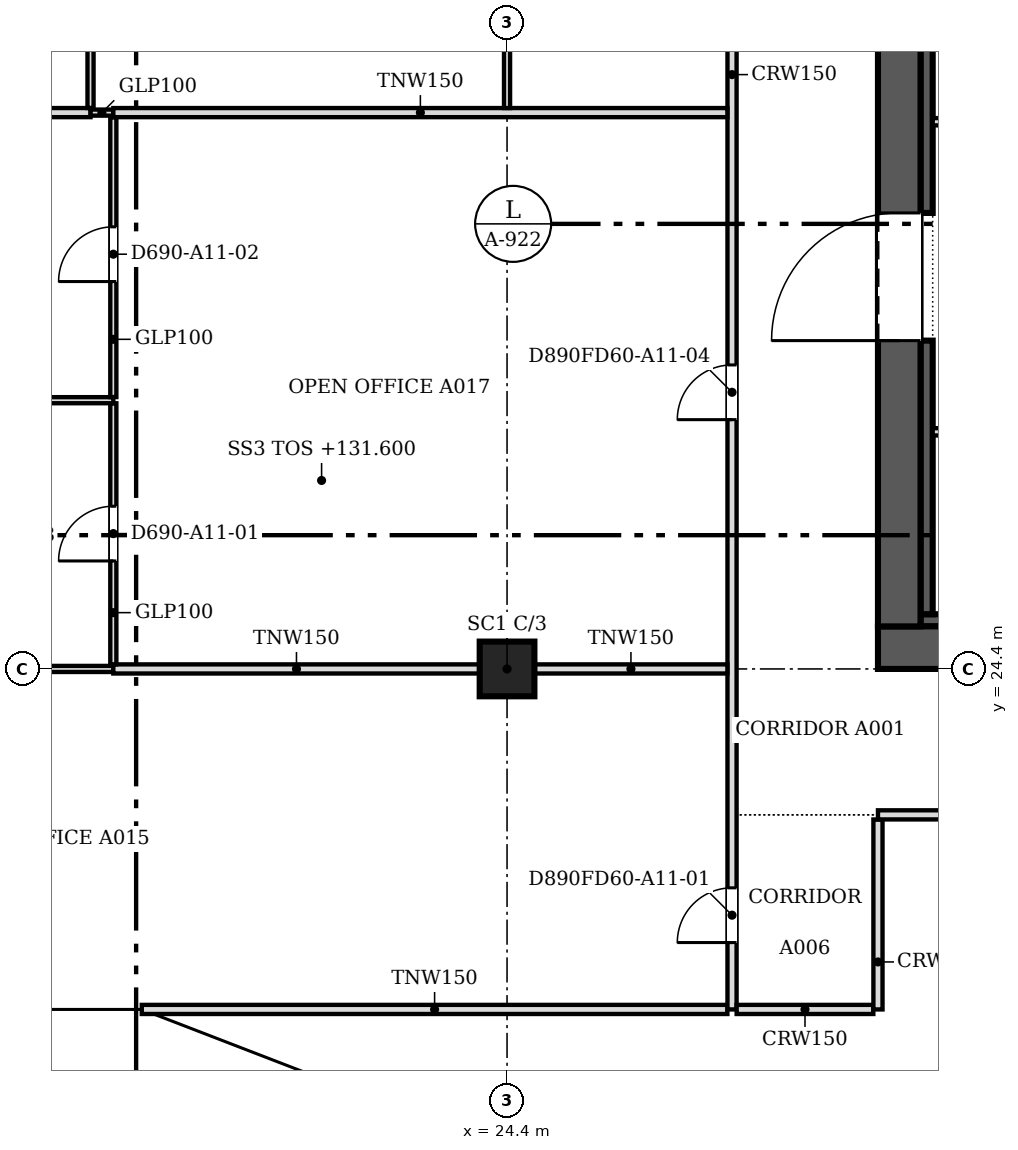
"""IFC4 building model, lengths in metres.
Left out: names, types, materials, properties, quantities, classifications, styles, units other than length and angle.
Written with IfcOpenShell. Run it as: python <this file> out.ifc"""

import sys

from ifc_helpers import new_model, si_unit, direction, frame, frame_2d, origin, origin_2d, place, context, subcontext, project, spatial, polyline, rectangle, outline, extrude, faceted_brep, source, transform, mapped, element, fill, save


model = new_model("IFC4")
c1 = context("Model", 3, precision=1e-05, world=origin(), true_north=direction((0.0, 1.0)))
c2 = subcontext(c1, "Body", "Model", "MODEL_VIEW")
j1 = project(units=[si_unit("LENGTHUNIT", "METRE"), si_unit("PLANEANGLEUNIT", "RADIAN")], contexts=[c1])
p1 = place(None, origin())
s1 = spatial("IfcSite", under=j1, at=p1, CompositionType="ELEMENT")
p2 = place(p1, origin())
s2 = spatial("IfcBuilding", under=s1, at=p2, CompositionType="ELEMENT")
p3 = place(p2, frame((0.0, 0.0, 131.6)))
s3 = spatial("IfcBuildingStorey", under=s2, at=p3, CompositionType="ELEMENT", Elevation=131.6)
p4 = place(p3, frame((24.4, 24.4, 0.0), z_axis=(0.0, 0.0, 1.0), x_axis=(1.0, 0.0, 0.0)))
e1 = element("IfcColumn", 1, at=p4, inside=s3, PredefinedType="COLUMN", context=c2, shape_type="SweptSolid", body=[
    extrude(rectangle(XDim=0.9, YDim=0.9, at=origin_2d()), origin(), (0.0, 0.0, 1.0), 3.6),
])
m1 = source(origin(), c2, "Body", "Brep", [
    faceted_brep([(3.05, -0.25, 0.0), (6.1, -0.25, 3.743), (6.1, -0.25, 3.857), (3.05, -0.25, 7.6), (0.0, -0.25, 3.8), (0.0, 0.25, 3.8), (3.05, 0.25, 7.6), (6.146, 0.25, 3.8), (3.05, 0.25, 0.0), (6.146, -0.0, 3.8)], [[[0, 1, 2, 3, 4]], [[5, 6, 7, 8]], [[8, 7, 9, 1, 0]], [[7, 6, 3, 2, 9]], [[6, 5, 4, 3]], [[5, 8, 0, 4]], [[1, 9, 2]]]),
])
p5 = place(p3, frame((12.2, 18.55, -3.8), z_axis=(0.0, 0.0, 1.0), x_axis=(1.0, 0.0, 0.0)))
e2 = element("IfcWall", 2, at=p5, inside=s3, PredefinedType="SOLIDWALL", context=c2, shape_type="MappedRepresentation", body=[
    mapped(m1, transform((0.0, 0.0, 0.0), scale=1.0)),
])
m2 = source(origin(), c2, "Body", "SweptSolid", [
    extrude(outline(polyline([(3.052, 0.397), (5.824, 3.8), (3.052, 7.202), (0.321, 3.8), (3.052, 0.397)])), frame((0.0, 0.26, 0.0), z_axis=(0.0, -1.0, 0.0), x_axis=(1.0, 0.0, 0.0)), (0.0, 0.0, 1.0), 0.52),
])
p6 = place(p5, origin())
e3 = element("IfcOpeningElement", 3, at=p6, cuts=e2, PredefinedType="OPENING", context=c2, shape_type="MappedRepresentation", body=[
    mapped(m2, transform((0.0, 0.0, 0.0), scale=1.0)),
])
m3 = source(origin(), c2, "Body", "Brep", [
    faceted_brep([(3.096, -0.25, 7.536), (0.047, -0.25, 3.856), (0.047, -0.25, 3.744), (3.096, -0.25, 0.064), (0.0, 0.25, 3.8), (3.149, 0.25, 7.6), (3.202, 0.25, 7.536), (3.202, 0.25, 0.064), (3.149, 0.25, 0.0), (3.149, -0.0, 0.0), (3.149, -0.0, 7.6), (0.0, 0.0, 3.8)], [[[0, 1, 2, 3]], [[4, 5, 6, 7, 8]], [[8, 7, 9]], [[6, 5, 10]], [[5, 4, 11, 1, 0, 10]], [[4, 8, 9, 3, 2, 11]], [[2, 1, 11]], [[3, 9, 7, 6, 10, 0]]]),
])
p7 = place(p3, frame((18.346, 18.55, -3.8), z_axis=(0.0, 0.0, 1.0), x_axis=(0.932985567668, -0.359913782069, 0.0)))
e4 = element("IfcWall", 4, at=p7, inside=s3, PredefinedType="SOLIDWALL", context=c2, shape_type="MappedRepresentation", body=[
    mapped(m3, transform((0.0, 0.0, 0.0), scale=1.0)),
])
m4 = source(origin(), c2, "Body", "SweptSolid", [
    extrude(outline(polyline([(2.949, 6.967), (0.325, 3.8), (2.949, 0.633), (2.949, 6.967)])), frame((0.0, 0.26, 0.0), z_axis=(0.0, -1.0, 0.0), x_axis=(1.0, 0.0, 0.0)), (0.0, 0.0, 1.0), 0.52),
])
p8 = place(p7, origin())
e5 = element("IfcOpeningElement", 5, at=p8, cuts=e4, PredefinedType="OPENING", context=c2, shape_type="MappedRepresentation", body=[
    mapped(m4, transform((0.0, 0.0, 0.0), scale=1.0)),
])
p9 = place(p2, frame((0.0, 0.0, 135.4)))
s4 = spatial("IfcBuildingStorey", under=s2, at=p9, CompositionType="ELEMENT", Elevation=135.4)
m5 = source(origin(), c2, "Body", "Brep", [
    faceted_brep([(3.05, -0.25, 7.543), (0.0, -0.25, 3.8), (3.05, -0.25, 0.057), (0.0, 0.25, 3.8), (3.096, 0.25, 7.6), (3.143, 0.25, 7.543), (3.143, 0.25, 0.056), (3.096, 0.25, 0.0), (3.096, -0.0, 0.0), (3.096, -0.0, 7.6)], [[[0, 1, 2]], [[3, 4, 5, 6, 7]], [[7, 6, 8]], [[5, 4, 9]], [[4, 3, 1, 0, 9]], [[3, 7, 8, 2, 1]], [[2, 8, 6, 5, 9, 0]]]),
])
p10 = place(p9, frame((15.25, 18.55, -3.8), z_axis=(0.0, 0.0, 1.0), x_axis=(1.0, 0.0, 0.0)))
e6 = element("IfcWall", 6, at=p10, inside=s4, PredefinedType="SOLIDWALL", context=c2, shape_type="MappedRepresentation", body=[
    mapped(m5, transform((0.0, 0.0, 0.0), scale=1.0)),
])
m6 = source(origin(), c2, "Body", "SweptSolid", [
    extrude(outline(polyline([(2.896, 6.959), (0.323, 3.8), (2.896, 0.641), (2.896, 6.959)])), frame((0.0, 0.26, 0.0), z_axis=(0.0, -1.0, 0.0), x_axis=(1.0, 0.0, 0.0)), (0.0, 0.0, 1.0), 0.52),
])
p11 = place(p10, origin())
e7 = element("IfcOpeningElement", 7, at=p11, cuts=e6, PredefinedType="OPENING", context=c2, shape_type="MappedRepresentation", body=[
    mapped(m6, transform((0.0, 0.0, 0.0), scale=1.0)),
])
m7 = source(origin(), c2, "Body", "Brep", [
    faceted_brep([(0.093, -0.25, 0.056), (3.143, -0.25, 3.736), (3.143, -0.25, 3.864), (0.093, -0.25, 7.544), (0.0, 0.25, 7.543), (0.047, 0.25, 7.6), (3.196, 0.25, 3.8), (0.047, 0.25, 0.0), (0.0, 0.25, 0.057), (3.196, -0.0, 3.8), (0.047, 0.0, 0.0), (0.047, 0.0, 7.6)], [[[0, 1, 2, 3]], [[4, 5, 6, 7, 8]], [[7, 6, 9, 1, 0, 10]], [[6, 5, 11, 3, 2, 9]], [[5, 4, 11]], [[8, 7, 10]], [[8, 10, 0, 3, 11, 4]], [[1, 9, 2]]]),
])
p12 = place(p9, frame((18.303, 18.567, -3.8), z_axis=(0.0, 0.0, 1.0), x_axis=(0.932978940178, -0.359930961693, 0.0)))
e8 = element("IfcWall", 8, at=p12, inside=s4, PredefinedType="SOLIDWALL", context=c2, shape_type="MappedRepresentation", body=[
    mapped(m7, transform((0.0, 0.0, 0.0), scale=1.0)),
])
m8 = source(origin(), c2, "Body", "SweptSolid", [
    extrude(outline(polyline([(0.247, 0.633), (2.871, 3.8), (0.247, 6.967), (0.247, 0.633)])), frame((0.0, 0.26, 0.0), z_axis=(0.0, -1.0, 0.0), x_axis=(1.0, 0.0, 0.0)), (0.0, 0.0, 1.0), 0.52),
])
p13 = place(p12, origin())
e9 = element("IfcOpeningElement", 9, at=p13, cuts=e8, PredefinedType="OPENING", context=c2, shape_type="MappedRepresentation", body=[
    mapped(m8, transform((0.0, 0.0, 0.0), scale=1.0)),
])
p14 = place(p3, frame((54.9, 24.75, 0.0), z_axis=(0.0, 0.0, 1.0), x_axis=(-1.0, 0.0, 0.0)))
e10 = element("IfcWall", 10, at=p14, inside=s3, PredefinedType="SHEAR", context=c2, shape_type="SweptSolid", body=[
    extrude(rectangle(XDim=24.4, YDim=0.7, at=frame_2d((12.2, 0.0))), origin(), (0.0, 0.0, 1.0), 3.8),
])
m9 = source(origin(), c2, "Body", "SweptSolid", [
    extrude(rectangle(XDim=1.2, YDim=2.1, at=frame_2d((0.6, 1.05))), frame((0.0, 0.36, 0.0), z_axis=(0.0, -1.0, 0.0), x_axis=(1.0, 0.0, 0.0)), (0.0, 0.0, 1.0), 0.72),
])
p15 = place(p14, frame((1.5, 0.0, 0.0)))
e11 = element("IfcOpeningElement", 11, at=p15, cuts=e10, PredefinedType="OPENING", context=c2, shape_type="MappedRepresentation", body=[
    mapped(m9, transform((0.0, 0.0, 0.0), scale=1.0)),
])
p16 = place(p3, frame((30.85, 25.1, 0.0), z_axis=(0.0, 0.0, 1.0), x_axis=(0.0, 1.0, 0.0)))
e12 = element("IfcWall", 12, at=p16, inside=s3, PredefinedType="SHEAR", context=c2, shape_type="SweptSolid", body=[
    extrude(rectangle(XDim=23.0, YDim=0.7, at=frame_2d((11.5, 0.0))), origin(), (0.0, 0.0, 1.0), 3.8),
])
m10 = source(origin(), c2, "Body", "SweptSolid", [
    extrude(rectangle(XDim=2.1, YDim=2.4, at=frame_2d((1.05, 1.2))), frame((0.0, 0.36, 0.0), z_axis=(0.0, -1.0, 0.0), x_axis=(1.0, 0.0, 0.0)), (0.0, 0.0, 1.0), 0.72),
])
p17 = place(p16, frame((4.7, 0.0, 0.0)))
e13 = element("IfcOpeningElement", 13, at=p17, cuts=e12, PredefinedType="OPENING", context=c2, shape_type="MappedRepresentation", body=[
    mapped(m10, transform((0.0, 0.0, 0.0), scale=1.0)),
])
p18 = place(p16, frame((16.2, 0.0, 0.0)))
e14 = element("IfcOpeningElement", 14, at=p18, cuts=e12, PredefinedType="OPENING", context=c2, shape_type="MappedRepresentation", body=[
    mapped(m10, transform((0.0, 0.0, 0.0), scale=1.0)),
])
p19 = place(p3, frame((31.2, 25.2, 0.0), z_axis=(0.0, 0.0, 1.0), x_axis=(1.0, 0.0, 0.0)))
e15 = element("IfcWall", 15, at=p19, inside=s3, PredefinedType="SOLIDWALL", context=c2, shape_type="SweptSolid", body=[
    extrude(rectangle(XDim=21.0, YDim=0.2, at=frame_2d((10.5, 0.0))), origin(), (0.0, 0.0, 1.0), 3.8),
])
p20 = place(p3, frame((31.3, 25.3, 0.0), z_axis=(0.0, 0.0, 1.0), x_axis=(0.0, 1.0, 0.0)))
e16 = element("IfcWall", 16, at=p20, inside=s3, PredefinedType="SOLIDWALL", context=c2, shape_type="SweptSolid", body=[
    extrude(rectangle(XDim=4.5, YDim=0.2, at=frame_2d((2.25, 0.0))), origin(), (0.0, 0.0, 1.0), 3.8),
])
p21 = place(p3, frame((31.3, 31.9, 0.0), z_axis=(0.0, 0.0, 1.0), x_axis=(0.0, 1.0, 0.0)))
e17 = element("IfcWall", 17, at=p21, inside=s3, PredefinedType="SOLIDWALL", context=c2, shape_type="SweptSolid", body=[
    extrude(rectangle(XDim=9.4, YDim=0.2, at=frame_2d((4.7, 0.0))), origin(), (0.0, 0.0, 1.0), 3.8),
])
p22 = place(p3, frame((31.4, 33.4, 0.0), z_axis=(0.0, 0.0, 1.0), x_axis=(1.0, 0.0, 0.0)))
e18 = element("IfcWall", 18, at=p22, inside=s3, PredefinedType="PARTITIONING", context=c2, shape_type="SweptSolid", body=[
    extrude(rectangle(XDim=11.05, YDim=0.12, at=frame_2d((5.525, 0.0))), origin(), (0.0, 0.0, 1.0), 3.6),
])
m11 = source(origin(), c2, "Body", "SweptSolid", [
    extrude(rectangle(XDim=0.9, YDim=2.1, at=frame_2d((0.45, 1.05))), frame((0.0, 0.07, 0.0), z_axis=(0.0, -1.0, 0.0), x_axis=(1.0, 0.0, 0.0)), (0.0, 0.0, 1.0), 0.14),
])
p23 = place(p22, frame((0.962, 0.0, 0.0)))
e19 = element("IfcOpeningElement", 19, at=p23, cuts=e18, PredefinedType="OPENING", context=c2, shape_type="MappedRepresentation", body=[
    mapped(m11, transform((0.0, 0.0, 0.0), scale=1.0)),
])
p24 = place(p22, frame((6.613, 0.0, 0.0)))
e20 = element("IfcOpeningElement", 20, at=p24, cuts=e18, PredefinedType="OPENING", context=c2, shape_type="MappedRepresentation", body=[
    mapped(m11, transform((0.0, 0.0, 0.0), scale=1.0)),
])
p25 = place(p3, frame((39.875, 28.3, 0.0), z_axis=(0.0, 0.0, 1.0), x_axis=(-1.0, 0.0, 0.0)))
e21 = element("IfcWall", 21, at=p25, inside=s3, PredefinedType="PARTITIONING", context=c2, shape_type="SweptSolid", body=[
    extrude(rectangle(XDim=8.475, YDim=0.12, at=frame_2d((4.238, 0.0))), origin(), (0.0, 0.0, 1.0), 3.6),
])
p26 = place(p25, frame((3.788, 0.0, 0.0)))
e22 = element("IfcOpeningElement", 22, at=p26, cuts=e21, PredefinedType="OPENING", context=c2, shape_type="MappedRepresentation", body=[
    mapped(m11, transform((0.0, 0.0, 0.0), scale=1.0)),
])
p27 = place(p3, frame((18.393, 18.8, 0.0), z_axis=(0.0, 0.0, 1.0), x_axis=(1.0, 0.0, 0.0)))
e23 = element("IfcWall", 23, at=p27, inside=s3, PredefinedType="PARTITIONING", context=c2, shape_type="SweptSolid", body=[
    extrude(rectangle(XDim=9.631, YDim=0.15, at=frame_2d((4.815, 0.0))), origin(), (0.0, 0.0, 1.0), 3.067),
])
p28 = place(p3, frame((28.1, 18.8, 0.0), z_axis=(0.0, 0.0, 1.0), x_axis=(0.0, 1.0, 0.0)))
e24 = element("IfcWall", 24, at=p28, inside=s3, PredefinedType="PARTITIONING", context=c2, shape_type="SweptSolid", body=[
    extrude(rectangle(XDim=26.5, YDim=0.15, at=frame_2d((13.25, 0.0))), origin(), (0.0, 0.0, 1.0), 3.067),
])
m12 = source(origin(), c2, "Body", "SweptSolid", [
    extrude(rectangle(XDim=0.9, YDim=2.1, at=frame_2d((0.45, 1.05))), frame((0.0, 0.085, 0.0), z_axis=(0.0, -1.0, 0.0), x_axis=(1.0, 0.0, 0.0)), (0.0, 0.0, 1.0), 0.17),
])
p29 = place(p28, frame((1.1, 0.0, 0.0)))
e25 = element("IfcOpeningElement", 25, at=p29, cuts=e24, PredefinedType="OPENING", context=c2, shape_type="MappedRepresentation", body=[
    mapped(m12, transform((0.0, 0.0, 0.0), scale=1.0)),
])
p30 = place(p28, frame((9.7, 0.0, 0.0)))
e26 = element("IfcOpeningElement", 26, at=p30, cuts=e24, PredefinedType="OPENING", context=c2, shape_type="MappedRepresentation", body=[
    mapped(m12, transform((0.0, 0.0, 0.0), scale=1.0)),
])
p31 = place(p28, frame((20.15, 0.0, 0.0)))
e27 = element("IfcOpeningElement", 27, at=p31, cuts=e24, PredefinedType="OPENING", context=c2, shape_type="MappedRepresentation", body=[
    mapped(m12, transform((0.0, 0.0, 0.0), scale=1.0)),
])
p32 = place(p3, frame((28.176, 18.8, 0.0), z_axis=(0.0, 0.0, 1.0), x_axis=(1.0, 0.0, 0.0)))
e28 = element("IfcWall", 28, at=p32, inside=s3, PredefinedType="PARTITIONING", context=c2, shape_type="SweptSolid", body=[
    extrude(rectangle(XDim=2.248, YDim=0.15, at=frame_2d((1.124, 0.0))), origin(), (0.0, 0.0, 1.0), 3.067),
])
p33 = place(p3, frame((30.5, 18.8, 0.0), z_axis=(0.0, 0.0, 1.0), x_axis=(0.0, 1.0, 0.0)))
e29 = element("IfcWall", 29, at=p33, inside=s3, PredefinedType="PARTITIONING", context=c2, shape_type="SweptSolid", body=[
    extrude(rectangle(XDim=3.124, YDim=0.15, at=frame_2d((1.562, 0.0))), origin(), (0.0, 0.0, 1.0), 3.067),
])
p34 = place(p3, frame((30.5, 22.0, 0.0), z_axis=(0.0, 0.0, 1.0), x_axis=(1.0, 0.0, 0.0)))
e30 = element("IfcWall", 30, at=p34, inside=s3, PredefinedType="PARTITIONING", context=c2, shape_type="SweptSolid", body=[
    extrude(rectangle(XDim=12.5, YDim=0.15, at=frame_2d((6.25, 0.0))), origin(), (0.0, 0.0, 1.0), 3.067),
])
p35 = place(p3, frame((12.651, 24.4, 0.0), z_axis=(0.0, 0.0, 1.0), x_axis=(1.0, 0.0, 0.0)))
e31 = element("IfcWall", 31, at=p35, inside=s3, PredefinedType="PARTITIONING", context=c2, shape_type="SweptSolid", body=[
    extrude(rectangle(XDim=5.273, YDim=0.1, at=frame_2d((2.637, 0.0))), origin(), (0.0, 0.0, 1.0), 3.067),
])
p36 = place(p3, frame((17.925, 24.4, 0.0), z_axis=(0.0, 0.0, 1.0), x_axis=(1.0, 0.0, 0.0)))
e32 = element("IfcWall", 32, at=p36, inside=s3, PredefinedType="PARTITIONING", context=c2, shape_type="SweptSolid", body=[
    extrude(rectangle(XDim=6.024, YDim=0.15, at=frame_2d((3.012, 0.0))), origin(), (0.0, 0.0, 1.0), 3.067),
])
p37 = place(p3, frame((24.851, 24.4, 0.0), z_axis=(0.0, 0.0, 1.0), x_axis=(1.0, 0.0, 0.0)))
e33 = element("IfcWall", 33, at=p37, inside=s3, PredefinedType="PARTITIONING", context=c2, shape_type="SweptSolid", body=[
    extrude(rectangle(XDim=3.173, YDim=0.15, at=frame_2d((1.586, 0.0))), origin(), (0.0, 0.0, 1.0), 3.067),
])
p38 = place(p3, frame((17.925, 24.476, 0.0), z_axis=(0.0, 0.0, 1.0), x_axis=(0.0, 1.0, 0.0)))
e34 = element("IfcWall", 34, at=p38, inside=s3, PredefinedType="PARTITIONING", context=c2, shape_type="SweptSolid", body=[
    extrude(rectangle(XDim=4.293, YDim=0.1, at=frame_2d((2.146, 0.0))), origin(), (0.0, 0.0, 1.0), 3.067),
])
m13 = source(origin(), c2, "Body", "SweptSolid", [
    extrude(rectangle(XDim=0.9, YDim=2.1, at=frame_2d((0.45, 1.05))), frame((0.0, 0.06, 0.0), z_axis=(0.0, -1.0, 0.0), x_axis=(1.0, 0.0, 0.0)), (0.0, 0.0, 1.0), 0.12),
])
p39 = place(p38, frame((1.7, 0.0, 0.0)))
e35 = element("IfcOpeningElement", 35, at=p39, cuts=e34, PredefinedType="OPENING", context=c2, shape_type="MappedRepresentation", body=[
    mapped(m13, transform((0.0, 0.0, 0.0), scale=1.0)),
])
p40 = place(p3, frame((12.2, 28.82, 0.0), z_axis=(0.0, 0.0, 1.0), x_axis=(1.0, 0.0, 0.0)))
e36 = element("IfcWall", 36, at=p40, inside=s3, PredefinedType="PARTITIONING", context=c2, shape_type="SweptSolid", body=[
    extrude(rectangle(XDim=5.725, YDim=0.1, at=frame_2d((2.863, 0.0))), origin(), (0.0, 0.0, 1.0), 3.067),
])
p41 = place(p3, frame((17.925, 28.871, 0.0), z_axis=(0.0, 0.0, 1.0), x_axis=(0.0, 1.0, 0.0)))
e37 = element("IfcWall", 37, at=p41, inside=s3, PredefinedType="PARTITIONING", context=c2, shape_type="SweptSolid", body=[
    extrude(rectangle(XDim=4.603, YDim=0.1, at=frame_2d((2.301, 0.0))), origin(), (0.0, 0.0, 1.0), 3.067),
])
p42 = place(p41, frame((1.9, 0.0, 0.0)))
e38 = element("IfcOpeningElement", 38, at=p42, cuts=e37, PredefinedType="OPENING", context=c2, shape_type="MappedRepresentation", body=[
    mapped(m13, transform((0.0, 0.0, 0.0), scale=1.0)),
])
p43 = place(p3, frame((12.2, 33.55, 0.0), z_axis=(0.0, 0.0, 1.0), x_axis=(1.0, 0.0, 0.0)))
e39 = element("IfcWall", 39, at=p43, inside=s3, PredefinedType="PARTITIONING", context=c2, shape_type="SweptSolid", body=[
    extrude(rectangle(XDim=5.35, YDim=0.15, at=frame_2d((2.675, 0.0))), origin(), (0.0, 0.0, 1.0), 3.067),
])
p44 = place(p3, frame((17.551, 33.55, 0.0), z_axis=(0.0, 0.0, 1.0), x_axis=(1.0, 0.0, 0.0)))
e40 = element("IfcWall", 40, at=p44, inside=s3, PredefinedType="PARTITIONING", context=c2, shape_type="SweptSolid", body=[
    extrude(rectangle(XDim=0.373, YDim=0.1, at=frame_2d((0.187, 0.0))), origin(), (0.0, 0.0, 1.0), 3.067),
])
p45 = place(p3, frame((17.925, 33.55, 0.0), z_axis=(0.0, 0.0, 1.0), x_axis=(1.0, 0.0, 0.0)))
e41 = element("IfcWall", 41, at=p45, inside=s3, PredefinedType="PARTITIONING", context=c2, shape_type="SweptSolid", body=[
    extrude(rectangle(XDim=10.099, YDim=0.15, at=frame_2d((5.049, 0.0))), origin(), (0.0, 0.0, 1.0), 3.067),
])
p46 = place(p3, frame((17.55, 33.626, 0.0), z_axis=(0.0, 0.0, 1.0), x_axis=(0.0, 1.0, 0.0)))
e42 = element("IfcWall", 42, at=p46, inside=s3, PredefinedType="PARTITIONING", context=c2, shape_type="SweptSolid", body=[
    extrude(rectangle(XDim=5.549, YDim=0.1, at=frame_2d((2.775, 0.0))), origin(), (0.0, 0.0, 1.0), 3.067),
])
p47 = place(p46, frame((2.3, 0.0, 0.0)))
e43 = element("IfcOpeningElement", 43, at=p47, cuts=e42, PredefinedType="OPENING", context=c2, shape_type="MappedRepresentation", body=[
    mapped(m13, transform((0.0, 0.0, 0.0), scale=1.0)),
])
p48 = place(p3, frame((24.4, 36.15, 0.0), z_axis=(0.0, 0.0, 1.0), x_axis=(0.0, -1.0, 0.0)))
e44 = element("IfcWall", 44, at=p48, inside=s3, PredefinedType="PARTITIONING", context=c2, shape_type="SweptSolid", body=[
    extrude(rectangle(XDim=2.525, YDim=0.1, at=frame_2d((1.262, 0.0))), origin(), (0.0, 0.0, 1.0), 3.067),
])
m14 = source(origin(), c2, "Body", "SweptSolid", [
    extrude(rectangle(XDim=2.1, YDim=2.4, at=frame_2d((1.05, 1.2))), frame((0.0, 0.025, 0.0), z_axis=(0.0, -1.0, 0.0), x_axis=(1.0, 0.0, 0.0)), (0.0, 0.0, 1.0), 0.05),
])
p49 = place(p17, origin())
e45 = element("IfcDoor", 45, at=p49, inside=s3, OperationType="DOUBLE_DOOR_SINGLE_SWING", PredefinedType="DOOR", context=c2, shape_type="MappedRepresentation", body=[
    mapped(m14, transform((0.0, 0.0, 0.0), scale=1.0)),
])
fill(e13, e45)
m15 = source(origin(), c2, "Body", "SweptSolid", [
    extrude(rectangle(XDim=0.9, YDim=2.1, at=frame_2d((0.45, 1.05))), frame((0.0, 0.025, 0.0), z_axis=(0.0, -1.0, 0.0), x_axis=(1.0, 0.0, 0.0)), (0.0, 0.0, 1.0), 0.05),
])
p50 = place(p29, origin())
e46 = element("IfcDoor", 46, at=p50, inside=s3, OperationType="SINGLE_SWING_LEFT", PredefinedType="DOOR", context=c2, shape_type="MappedRepresentation", body=[
    mapped(m15, transform((0.0, 0.0, 0.0), scale=1.0)),
])
fill(e25, e46)
p51 = place(p39, origin())
e47 = element("IfcDoor", 47, at=p51, inside=s3, OperationType="SINGLE_SWING_LEFT", PredefinedType="DOOR", context=c2, shape_type="MappedRepresentation", body=[
    mapped(m15, transform((0.0, 0.0, 0.0), scale=1.0)),
])
fill(e35, e47)
p52 = place(p42, origin())
e48 = element("IfcDoor", 48, at=p52, inside=s3, OperationType="SINGLE_SWING_LEFT", PredefinedType="DOOR", context=c2, shape_type="MappedRepresentation", body=[
    mapped(m15, transform((0.0, 0.0, 0.0), scale=1.0)),
])
fill(e38, e48)
p53 = place(p30, origin())
e49 = element("IfcDoor", 49, at=p53, inside=s3, OperationType="SINGLE_SWING_LEFT", PredefinedType="DOOR", context=c2, shape_type="MappedRepresentation", body=[
    mapped(m15, transform((0.0, 0.0, 0.0), scale=1.0)),
])
fill(e26, e49)
save(model, sys.argv[1])
